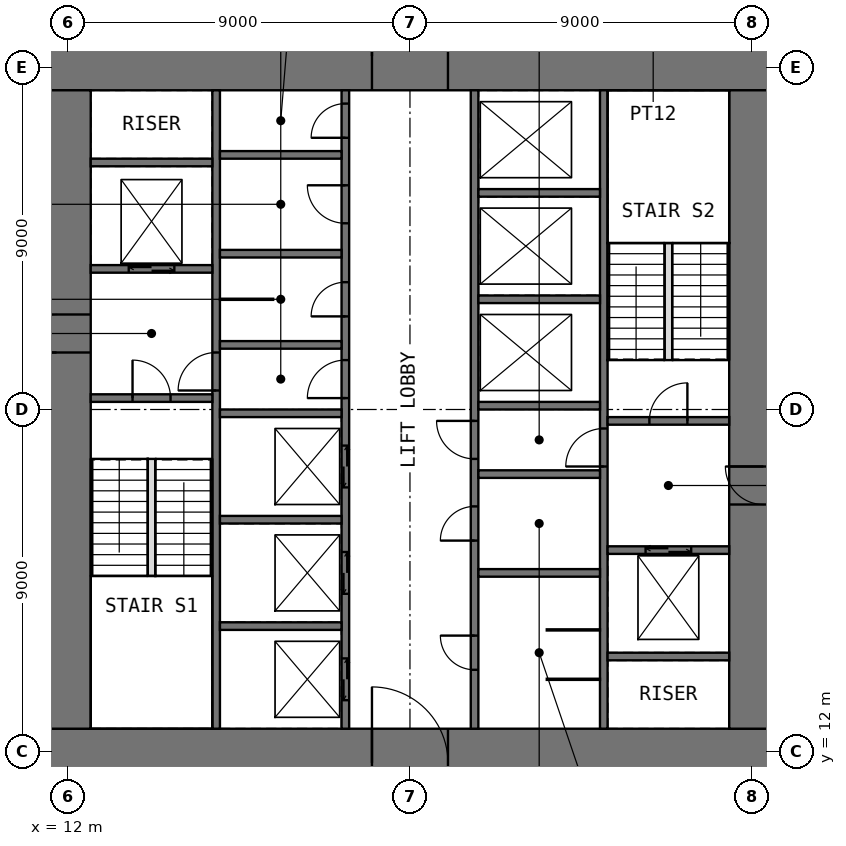
"""IFC4 building model, lengths in metres.
Left out: names, types, materials, properties, quantities, classifications, styles, units other than length and angle.
Written with IfcOpenShell. Run it as: python <this file> out.ifc"""

import sys

from ifc_helpers import new_model, si_unit, direction, frame, frame_2d, origin, place, context, subcontext, project, spatial, rectangle, extrude, element, fill, save


model = new_model("IFC4")
c1 = context("Model", 3, precision=1e-05, world=origin(), true_north=direction((0.0, 1.0)))
c2 = subcontext(c1, "Body", "Model", "MODEL_VIEW")
j1 = project(units=[si_unit("LENGTHUNIT", "METRE"), si_unit("PLANEANGLEUNIT", "RADIAN")], contexts=[c1])
p1 = place(None, origin())
s1 = spatial("IfcSite", under=j1, at=p1, CompositionType="ELEMENT")
p2 = place(p1, origin())
s2 = spatial("IfcBuilding", under=s1, at=p2, CompositionType="ELEMENT")
p3 = place(p2, frame((0.0, 0.0, 78.5)))
s3 = spatial("IfcBuildingStorey", under=s2, at=p3, CompositionType="ELEMENT", Elevation=78.5)
p4 = place(p3, frame((10.8, 11.7, -0.05), z_axis=(0.0, 0.0, 1.0), x_axis=(1.0, 0.0, 0.0)))
e1 = element("IfcWall", 1, at=p4, inside=s3, PredefinedType="SHEAR", context=c2, shape_type="SweptSolid", body=[
    extrude(rectangle(XDim=20.4, YDim=1.8, at=frame_2d((10.2, 0.0))), origin(), (0.0, 0.0, 1.0), 4.0),
])
p5 = place(p4, frame((9.2, 0.0, 0.05)))
e2 = element("IfcOpeningElement", 2, at=p5, cuts=e1, PredefinedType="OPENING", context=c2, shape_type="SweptSolid", body=[
    extrude(rectangle(XDim=2.0, YDim=2.2, at=frame_2d((1.0, 1.1))), frame((0.0, 0.91, 0.0), z_axis=(0.0, -1.0, 0.0), x_axis=(1.0, 0.0, 0.0)), (0.0, 0.0, 1.0), 1.82),
])
p6 = place(p3, frame((10.8, 30.3, -0.05), z_axis=(0.0, 0.0, 1.0), x_axis=(1.0, 0.0, 0.0)))
e3 = element("IfcWall", 3, at=p6, inside=s3, PredefinedType="SHEAR", context=c2, shape_type="SweptSolid", body=[
    extrude(rectangle(XDim=20.4, YDim=1.8, at=frame_2d((10.2, 0.0))), origin(), (0.0, 0.0, 1.0), 4.0),
])
p7 = place(p6, frame((9.2, 0.0, 0.05)))
e4 = element("IfcOpeningElement", 4, at=p7, cuts=e3, PredefinedType="OPENING", context=c2, shape_type="SweptSolid", body=[
    extrude(rectangle(XDim=2.0, YDim=2.2, at=frame_2d((1.0, 1.1))), frame((0.0, 0.91, 0.0), z_axis=(0.0, -1.0, 0.0), x_axis=(1.0, 0.0, 0.0)), (0.0, 0.0, 1.0), 1.82),
])
p8 = place(p3, frame((11.7, 12.6, -0.05), z_axis=(0.0, 0.0, 1.0), x_axis=(0.0, 1.0, 0.0)))
e5 = element("IfcWall", 5, at=p8, inside=s3, PredefinedType="SHEAR", context=c2, shape_type="SweptSolid", body=[
    extrude(rectangle(XDim=16.8, YDim=1.8, at=frame_2d((8.4, 0.0))), origin(), (0.0, 0.0, 1.0), 4.0),
])
p9 = place(p8, frame((9.9, 0.0, 0.05)))
e6 = element("IfcOpeningElement", 6, at=p9, cuts=e5, PredefinedType="OPENING", context=c2, shape_type="SweptSolid", body=[
    extrude(rectangle(XDim=1.0, YDim=2.2, at=frame_2d((0.5, 1.1))), frame((0.0, 0.91, 0.0), z_axis=(0.0, -1.0, 0.0), x_axis=(1.0, 0.0, 0.0)), (0.0, 0.0, 1.0), 1.82),
])
p10 = place(p3, frame((30.3, 12.6, -0.05), z_axis=(0.0, 0.0, 1.0), x_axis=(0.0, 1.0, 0.0)))
e7 = element("IfcWall", 7, at=p10, inside=s3, PredefinedType="SHEAR", context=c2, shape_type="SweptSolid", body=[
    extrude(rectangle(XDim=16.8, YDim=1.8, at=frame_2d((8.4, 0.0))), origin(), (0.0, 0.0, 1.0), 4.0),
])
p11 = place(p10, frame((5.9, 0.0, 0.05)))
e8 = element("IfcOpeningElement", 8, at=p11, cuts=e7, PredefinedType="OPENING", context=c2, shape_type="SweptSolid", body=[
    extrude(rectangle(XDim=1.0, YDim=2.2, at=frame_2d((0.5, 1.1))), frame((0.0, 0.91, 0.0), z_axis=(0.0, -1.0, 0.0), x_axis=(1.0, 0.0, 0.0)), (0.0, 0.0, 1.0), 1.82),
])
p12 = place(p3, frame((15.9, 12.6, -0.05), z_axis=(0.0, 0.0, 1.0), x_axis=(0.0, 1.0, 0.0)))
e9 = element("IfcWall", 9, at=p12, inside=s3, PredefinedType="SHEAR", context=c2, shape_type="SweptSolid", body=[
    extrude(rectangle(XDim=16.8, YDim=0.2, at=frame_2d((8.4, 0.0))), origin(), (0.0, 0.0, 1.0), 4.0),
])
p13 = place(p12, frame((8.9, 0.0, 0.05)))
e10 = element("IfcOpeningElement", 10, at=p13, cuts=e9, PredefinedType="OPENING", context=c2, shape_type="SweptSolid", body=[
    extrude(rectangle(XDim=1.0, YDim=2.2, at=frame_2d((0.5, 1.1))), frame((0.0, 0.11, 0.0), z_axis=(0.0, -1.0, 0.0), x_axis=(1.0, 0.0, 0.0)), (0.0, 0.0, 1.0), 0.22),
])
p14 = place(p3, frame((19.3, 12.6, -0.05), z_axis=(0.0, 0.0, 1.0), x_axis=(0.0, 1.0, 0.0)))
e11 = element("IfcWall", 11, at=p14, inside=s3, PredefinedType="SHEAR", context=c2, shape_type="SweptSolid", body=[
    extrude(rectangle(XDim=16.8, YDim=0.2, at=frame_2d((8.4, 0.0))), origin(), (0.0, 0.0, 1.0), 4.0),
])
p15 = place(p14, frame((8.7, 0.0, 0.05)))
e12 = element("IfcOpeningElement", 12, at=p15, cuts=e11, PredefinedType="OPENING", context=c2, shape_type="SweptSolid", body=[
    extrude(rectangle(XDim=1.0, YDim=2.2, at=frame_2d((0.5, 1.1))), frame((0.0, 0.11, 0.0), z_axis=(0.0, -1.0, 0.0), x_axis=(1.0, 0.0, 0.0)), (0.0, 0.0, 1.0), 0.22),
])
p16 = place(p14, frame((10.85, 0.0, 0.05)))
e13 = element("IfcOpeningElement", 13, at=p16, cuts=e11, PredefinedType="OPENING", context=c2, shape_type="SweptSolid", body=[
    extrude(rectangle(XDim=0.9, YDim=2.2, at=frame_2d((0.45, 1.1))), frame((0.0, 0.11, 0.0), z_axis=(0.0, -1.0, 0.0), x_axis=(1.0, 0.0, 0.0)), (0.0, 0.0, 1.0), 0.22),
])
p17 = place(p14, frame((13.3, 0.0, 0.05)))
e14 = element("IfcOpeningElement", 14, at=p17, cuts=e11, PredefinedType="OPENING", context=c2, shape_type="SweptSolid", body=[
    extrude(rectangle(XDim=1.0, YDim=2.2, at=frame_2d((0.5, 1.1))), frame((0.0, 0.11, 0.0), z_axis=(0.0, -1.0, 0.0), x_axis=(1.0, 0.0, 0.0)), (0.0, 0.0, 1.0), 0.22),
])
p18 = place(p14, frame((15.55, 0.0, 0.05)))
e15 = element("IfcOpeningElement", 15, at=p18, cuts=e11, PredefinedType="OPENING", context=c2, shape_type="SweptSolid", body=[
    extrude(rectangle(XDim=0.9, YDim=2.2, at=frame_2d((0.45, 1.1))), frame((0.0, 0.11, 0.0), z_axis=(0.0, -1.0, 0.0), x_axis=(1.0, 0.0, 0.0)), (0.0, 0.0, 1.0), 0.22),
])
p19 = place(p14, frame((0.75, 0.0, 0.05)))
e16 = element("IfcOpeningElement", 16, at=p19, cuts=e11, PredefinedType="OPENING", context=c2, shape_type="SweptSolid", body=[
    extrude(rectangle(XDim=1.1, YDim=2.2, at=frame_2d((0.55, 1.1))), frame((0.0, 0.11, 0.0), z_axis=(0.0, -1.0, 0.0), x_axis=(1.0, 0.0, 0.0)), (0.0, 0.0, 1.0), 0.22),
])
p20 = place(p14, frame((3.55, 0.0, 0.05)))
e17 = element("IfcOpeningElement", 17, at=p20, cuts=e11, PredefinedType="OPENING", context=c2, shape_type="SweptSolid", body=[
    extrude(rectangle(XDim=1.1, YDim=2.2, at=frame_2d((0.55, 1.1))), frame((0.0, 0.11, 0.0), z_axis=(0.0, -1.0, 0.0), x_axis=(1.0, 0.0, 0.0)), (0.0, 0.0, 1.0), 0.22),
])
p21 = place(p14, frame((6.35, 0.0, 0.05)))
e18 = element("IfcOpeningElement", 18, at=p21, cuts=e11, PredefinedType="OPENING", context=c2, shape_type="SweptSolid", body=[
    extrude(rectangle(XDim=1.1, YDim=2.2, at=frame_2d((0.55, 1.1))), frame((0.0, 0.11, 0.0), z_axis=(0.0, -1.0, 0.0), x_axis=(1.0, 0.0, 0.0)), (0.0, 0.0, 1.0), 0.22),
])
p22 = place(p3, frame((22.7, 12.6, -0.05), z_axis=(0.0, 0.0, 1.0), x_axis=(0.0, 1.0, 0.0)))
e19 = element("IfcWall", 19, at=p22, inside=s3, PredefinedType="SHEAR", context=c2, shape_type="SweptSolid", body=[
    extrude(rectangle(XDim=16.8, YDim=0.2, at=frame_2d((8.4, 0.0))), origin(), (0.0, 0.0, 1.0), 4.0),
])
p23 = place(p22, frame((7.1, 0.0, 0.05)))
e20 = element("IfcOpeningElement", 20, at=p23, cuts=e19, PredefinedType="OPENING", context=c2, shape_type="SweptSolid", body=[
    extrude(rectangle(XDim=1.0, YDim=2.2, at=frame_2d((0.5, 1.1))), frame((0.0, 0.11, 0.0), z_axis=(0.0, -1.0, 0.0), x_axis=(1.0, 0.0, 0.0)), (0.0, 0.0, 1.0), 0.22),
])
p24 = place(p22, frame((1.55, 0.0, 0.05)))
e21 = element("IfcOpeningElement", 21, at=p24, cuts=e19, PredefinedType="OPENING", context=c2, shape_type="SweptSolid", body=[
    extrude(rectangle(XDim=0.9, YDim=2.2, at=frame_2d((0.45, 1.1))), frame((0.0, 0.11, 0.0), z_axis=(0.0, -1.0, 0.0), x_axis=(1.0, 0.0, 0.0)), (0.0, 0.0, 1.0), 0.22),
])
p25 = place(p22, frame((4.95, 0.0, 0.05)))
e22 = element("IfcOpeningElement", 22, at=p25, cuts=e19, PredefinedType="OPENING", context=c2, shape_type="SweptSolid", body=[
    extrude(rectangle(XDim=0.9, YDim=2.2, at=frame_2d((0.45, 1.1))), frame((0.0, 0.11, 0.0), z_axis=(0.0, -1.0, 0.0), x_axis=(1.0, 0.0, 0.0)), (0.0, 0.0, 1.0), 0.22),
])
p26 = place(p3, frame((26.1, 12.6, -0.05), z_axis=(0.0, 0.0, 1.0), x_axis=(0.0, 1.0, 0.0)))
e23 = element("IfcWall", 23, at=p26, inside=s3, PredefinedType="SHEAR", context=c2, shape_type="SweptSolid", body=[
    extrude(rectangle(XDim=16.8, YDim=0.2, at=frame_2d((8.4, 0.0))), origin(), (0.0, 0.0, 1.0), 4.0),
])
p27 = place(p26, frame((6.9, 0.0, 0.05)))
e24 = element("IfcOpeningElement", 24, at=p27, cuts=e23, PredefinedType="OPENING", context=c2, shape_type="SweptSolid", body=[
    extrude(rectangle(XDim=1.0, YDim=2.2, at=frame_2d((0.5, 1.1))), frame((0.0, 0.11, 0.0), z_axis=(0.0, -1.0, 0.0), x_axis=(1.0, 0.0, 0.0)), (0.0, 0.0, 1.0), 0.22),
])
p28 = place(p3, frame((12.6, 21.3, -0.05), z_axis=(0.0, 0.0, 1.0), x_axis=(1.0, 0.0, 0.0)))
e25 = element("IfcWall", 25, at=p28, inside=s3, PredefinedType="SHEAR", context=c2, shape_type="SweptSolid", body=[
    extrude(rectangle(XDim=3.2, YDim=0.2, at=frame_2d((1.6, 0.0))), origin(), (0.0, 0.0, 1.0), 4.0),
])
p29 = place(p28, frame((1.1, 0.0, 0.05)))
e26 = element("IfcOpeningElement", 26, at=p29, cuts=e25, PredefinedType="OPENING", context=c2, shape_type="SweptSolid", body=[
    extrude(rectangle(XDim=1.0, YDim=2.2, at=frame_2d((0.5, 1.1))), frame((0.0, 0.11, 0.0), z_axis=(0.0, -1.0, 0.0), x_axis=(1.0, 0.0, 0.0)), (0.0, 0.0, 1.0), 0.22),
])
p30 = place(p3, frame((12.6, 24.7, -0.05), z_axis=(0.0, 0.0, 1.0), x_axis=(1.0, 0.0, 0.0)))
e27 = element("IfcWall", 27, at=p30, inside=s3, PredefinedType="SHEAR", context=c2, shape_type="SweptSolid", body=[
    extrude(rectangle(XDim=3.2, YDim=0.2, at=frame_2d((1.6, 0.0))), origin(), (0.0, 0.0, 1.0), 4.0),
])
p31 = place(p30, frame((1.0, 0.0, 0.05)))
e28 = element("IfcOpeningElement", 28, at=p31, cuts=e27, PredefinedType="OPENING", context=c2, shape_type="SweptSolid", body=[
    extrude(rectangle(XDim=1.2, YDim=2.2, at=frame_2d((0.6, 1.1))), frame((0.0, 0.11, 0.0), z_axis=(0.0, -1.0, 0.0), x_axis=(1.0, 0.0, 0.0)), (0.0, 0.0, 1.0), 0.22),
])
for number, where, z_axis, x_axis in (
    (29, (12.6, 27.5, -0.05), (0.0, 0.0, 1.0), (1.0, 0.0, 0.0)),
    (30, (16.0, 15.3, -0.05), (0.0, 0.0, 1.0), (1.0, 0.0, 0.0)),
    (31, (16.0, 18.1, -0.05), (0.0, 0.0, 1.0), (1.0, 0.0, 0.0)),
    (32, (16.0, 20.9, -0.05), (0.0, 0.0, 1.0), (1.0, 0.0, 0.0)),
    (33, (16.0, 22.7, -0.05), (0.0, 0.0, 1.0), (1.0, 0.0, 0.0)),
    (34, (16.0, 25.1, -0.05), (0.0, 0.0, 1.0), (1.0, 0.0, 0.0)),
    (35, (16.0, 27.7, -0.05), (0.0, 0.0, 1.0), (1.0, 0.0, 0.0)),
    (36, (22.8, 16.7, -0.05), (0.0, 0.0, 1.0), (1.0, 0.0, 0.0)),
    (37, (22.8, 19.3, -0.05), (0.0, 0.0, 1.0), (1.0, 0.0, 0.0)),
    (38, (22.8, 21.1, -0.05), (0.0, 0.0, 1.0), (1.0, 0.0, 0.0)),
    (39, (22.8, 23.9, -0.05), (0.0, 0.0, 1.0), (1.0, 0.0, 0.0)),
    (40, (22.8, 26.7, -0.05), (0.0, 0.0, 1.0), (1.0, 0.0, 0.0)),
    (41, (26.2, 14.5, -0.05), (0.0, 0.0, 1.0), (1.0, 0.0, 0.0)),
):
    element("IfcWall", number, at=place(p3, frame(where, z_axis=z_axis, x_axis=x_axis)), inside=s3, PredefinedType="SHEAR", context=c2, shape_type="SweptSolid", body=[
        extrude(rectangle(XDim=3.2, YDim=0.2, at=frame_2d((1.6, 0.0))), origin(), (0.0, 0.0, 1.0), 4.0),
    ])
p32 = place(p3, frame((26.2, 17.3, -0.05), z_axis=(0.0, 0.0, 1.0), x_axis=(1.0, 0.0, 0.0)))
e42 = element("IfcWall", 42, at=p32, inside=s3, PredefinedType="SHEAR", context=c2, shape_type="SweptSolid", body=[
    extrude(rectangle(XDim=3.2, YDim=0.2, at=frame_2d((1.6, 0.0))), origin(), (0.0, 0.0, 1.0), 4.0),
])
p33 = place(p32, frame((1.0, 0.0, 0.05)))
e43 = element("IfcOpeningElement", 43, at=p33, cuts=e42, PredefinedType="OPENING", context=c2, shape_type="SweptSolid", body=[
    extrude(rectangle(XDim=1.2, YDim=2.2, at=frame_2d((0.6, 1.1))), frame((0.0, 0.11, 0.0), z_axis=(0.0, -1.0, 0.0), x_axis=(1.0, 0.0, 0.0)), (0.0, 0.0, 1.0), 0.22),
])
p34 = place(p3, frame((26.2, 20.7, -0.05), z_axis=(0.0, 0.0, 1.0), x_axis=(1.0, 0.0, 0.0)))
e44 = element("IfcWall", 44, at=p34, inside=s3, PredefinedType="SHEAR", context=c2, shape_type="SweptSolid", body=[
    extrude(rectangle(XDim=3.2, YDim=0.2, at=frame_2d((1.6, 0.0))), origin(), (0.0, 0.0, 1.0), 4.0),
])
p35 = place(p34, frame((1.1, 0.0, 0.05)))
e45 = element("IfcOpeningElement", 45, at=p35, cuts=e44, PredefinedType="OPENING", context=c2, shape_type="SweptSolid", body=[
    extrude(rectangle(XDim=1.0, YDim=2.2, at=frame_2d((0.5, 1.1))), frame((0.0, 0.11, 0.0), z_axis=(0.0, -1.0, 0.0), x_axis=(1.0, 0.0, 0.0)), (0.0, 0.0, 1.0), 0.22),
])
for number, where, z_axis, x_axis in (
    (46, (24.6, 13.9, 0.0), (0.0, 0.0, 1.0), (1.0, 0.0, 0.0)),
    (47, (24.6, 15.2, 0.0), (0.0, 0.0, 1.0), (1.0, 0.0, 0.0)),
    (48, (16.0, 23.9, 0.0), (0.0, 0.0, 1.0), (1.0, 0.0, 0.0)),
):
    element("IfcWall", number, at=place(p3, frame(where, z_axis=z_axis, x_axis=x_axis)), inside=s3, PredefinedType="PARTITIONING", context=c2, shape_type="SweptSolid", body=[
        extrude(rectangle(XDim=1.4, YDim=0.03, at=frame_2d((0.7, 0.0))), origin(), (0.0, 0.0, 1.0), 3.75),
    ])
for number, where, z_axis, x_axis in (
    (49, (14.2, 16.62, 0.0), (0.0, 0.0, 1.0), (0.0, 1.0, 0.0)),
    (50, (27.8, 22.3, 0.0), (0.0, 0.0, 1.0), (0.0, 1.0, 0.0)),
):
    element("IfcWall", number, at=place(p3, frame(where, z_axis=z_axis, x_axis=x_axis)), inside=s3, PredefinedType="PARTITIONING", context=c2, shape_type="SweptSolid", body=[
        extrude(rectangle(XDim=3.08, YDim=0.2, at=frame_2d((1.54, 0.0))), origin(), (0.0, 0.0, 1.0), 4.0),
    ])
p36 = place(p5, origin())
e51 = element("IfcDoor", 51, at=p36, inside=s3, OperationType="DOUBLE_DOOR_SINGLE_SWING", PredefinedType="DOOR", context=c2, shape_type="SweptSolid", body=[
    extrude(rectangle(XDim=2.0, YDim=2.2, at=frame_2d((1.0, 1.1))), frame((0.0, 0.025, 0.0), z_axis=(0.0, -1.0, 0.0), x_axis=(1.0, 0.0, 0.0)), (0.0, 0.0, 1.0), 0.05),
])
fill(e2, e51)
p37 = place(p7, origin())
e52 = element("IfcDoor", 52, at=p37, inside=s3, OperationType="DOUBLE_DOOR_SINGLE_SWING", PredefinedType="DOOR", context=c2, shape_type="SweptSolid", body=[
    extrude(rectangle(XDim=2.0, YDim=2.2, at=frame_2d((1.0, 1.1))), frame((0.0, 0.025, 0.0), z_axis=(0.0, -1.0, 0.0), x_axis=(1.0, 0.0, 0.0)), (0.0, 0.0, 1.0), 0.05),
])
fill(e4, e52)
p38 = place(p9, origin())
e53 = element("IfcDoor", 53, at=p38, inside=s3, OperationType="SINGLE_SWING_LEFT", PredefinedType="DOOR", context=c2, shape_type="SweptSolid", body=[
    extrude(rectangle(XDim=1.0, YDim=2.2, at=frame_2d((0.5, 1.1))), frame((0.0, 0.025, 0.0), z_axis=(0.0, -1.0, 0.0), x_axis=(1.0, 0.0, 0.0)), (0.0, 0.0, 1.0), 0.05),
])
fill(e6, e53)
p39 = place(p11, origin())
e54 = element("IfcDoor", 54, at=p39, inside=s3, OperationType="SINGLE_SWING_RIGHT", PredefinedType="DOOR", context=c2, shape_type="SweptSolid", body=[
    extrude(rectangle(XDim=1.0, YDim=2.2, at=frame_2d((0.5, 1.1))), frame((0.0, 0.025, 0.0), z_axis=(0.0, -1.0, 0.0), x_axis=(1.0, 0.0, 0.0)), (0.0, 0.0, 1.0), 0.05),
])
fill(e8, e54)
p40 = place(p29, origin())
e55 = element("IfcDoor", 55, at=p40, inside=s3, OperationType="SINGLE_SWING_LEFT", PredefinedType="DOOR", context=c2, shape_type="SweptSolid", body=[
    extrude(rectangle(XDim=1.0, YDim=2.2, at=frame_2d((0.5, 1.1))), frame((0.0, 0.025, 0.0), z_axis=(0.0, -1.0, 0.0), x_axis=(1.0, 0.0, 0.0)), (0.0, 0.0, 1.0), 0.05),
])
fill(e26, e55)
p41 = place(p35, origin())
e56 = element("IfcDoor", 56, at=p41, inside=s3, OperationType="SINGLE_SWING_RIGHT", PredefinedType="DOOR", context=c2, shape_type="SweptSolid", body=[
    extrude(rectangle(XDim=1.0, YDim=2.2, at=frame_2d((0.5, 1.1))), frame((0.0, 0.025, 0.0), z_axis=(0.0, -1.0, 0.0), x_axis=(1.0, 0.0, 0.0)), (0.0, 0.0, 1.0), 0.05),
])
fill(e45, e56)
p42 = place(p13, origin())
e57 = element("IfcDoor", 57, at=p42, inside=s3, OperationType="SINGLE_SWING_LEFT", PredefinedType="DOOR", context=c2, shape_type="SweptSolid", body=[
    extrude(rectangle(XDim=1.0, YDim=2.2, at=frame_2d((0.5, 1.1))), frame((0.0, 0.025, 0.0), z_axis=(0.0, -1.0, 0.0), x_axis=(1.0, 0.0, 0.0)), (0.0, 0.0, 1.0), 0.05),
])
fill(e10, e57)
p43 = place(p27, origin())
e58 = element("IfcDoor", 58, at=p43, inside=s3, OperationType="SINGLE_SWING_LEFT", PredefinedType="DOOR", context=c2, shape_type="SweptSolid", body=[
    extrude(rectangle(XDim=1.0, YDim=2.2, at=frame_2d((0.5, 1.1))), frame((0.0, 0.025, 0.0), z_axis=(0.0, -1.0, 0.0), x_axis=(1.0, 0.0, 0.0)), (0.0, 0.0, 1.0), 0.05),
])
fill(e24, e58)
p44 = place(p15, origin())
e59 = element("IfcDoor", 59, at=p44, inside=s3, OperationType="SINGLE_SWING_LEFT", PredefinedType="DOOR", context=c2, shape_type="SweptSolid", body=[
    extrude(rectangle(XDim=1.0, YDim=2.2, at=frame_2d((0.5, 1.1))), frame((0.0, 0.025, 0.0), z_axis=(0.0, -1.0, 0.0), x_axis=(1.0, 0.0, 0.0)), (0.0, 0.0, 1.0), 0.05),
])
fill(e12, e59)
p45 = place(p23, origin())
e60 = element("IfcDoor", 60, at=p45, inside=s3, OperationType="SINGLE_SWING_RIGHT", PredefinedType="DOOR", context=c2, shape_type="SweptSolid", body=[
    extrude(rectangle(XDim=1.0, YDim=2.2, at=frame_2d((0.5, 1.1))), frame((0.0, 0.025, 0.0), z_axis=(0.0, -1.0, 0.0), x_axis=(1.0, 0.0, 0.0)), (0.0, 0.0, 1.0), 0.05),
])
fill(e20, e60)
p46 = place(p16, origin())
e61 = element("IfcDoor", 61, at=p46, inside=s3, OperationType="SINGLE_SWING_LEFT", PredefinedType="DOOR", context=c2, shape_type="SweptSolid", body=[
    extrude(rectangle(XDim=0.9, YDim=2.2, at=frame_2d((0.45, 1.1))), frame((0.0, 0.025, 0.0), z_axis=(0.0, -1.0, 0.0), x_axis=(1.0, 0.0, 0.0)), (0.0, 0.0, 1.0), 0.05),
])
fill(e13, e61)
p47 = place(p17, origin())
e62 = element("IfcDoor", 62, at=p47, inside=s3, OperationType="SINGLE_SWING_RIGHT", PredefinedType="DOOR", context=c2, shape_type="SweptSolid", body=[
    extrude(rectangle(XDim=1.0, YDim=2.2, at=frame_2d((0.5, 1.1))), frame((0.0, 0.025, 0.0), z_axis=(0.0, -1.0, 0.0), x_axis=(1.0, 0.0, 0.0)), (0.0, 0.0, 1.0), 0.05),
])
fill(e14, e62)
p48 = place(p18, origin())
e63 = element("IfcDoor", 63, at=p48, inside=s3, OperationType="SINGLE_SWING_LEFT", PredefinedType="DOOR", context=c2, shape_type="SweptSolid", body=[
    extrude(rectangle(XDim=0.9, YDim=2.2, at=frame_2d((0.45, 1.1))), frame((0.0, 0.025, 0.0), z_axis=(0.0, -1.0, 0.0), x_axis=(1.0, 0.0, 0.0)), (0.0, 0.0, 1.0), 0.05),
])
fill(e15, e63)
p49 = place(p24, origin())
e64 = element("IfcDoor", 64, at=p49, inside=s3, OperationType="SINGLE_SWING_RIGHT", PredefinedType="DOOR", context=c2, shape_type="SweptSolid", body=[
    extrude(rectangle(XDim=0.9, YDim=2.2, at=frame_2d((0.45, 1.1))), frame((0.0, 0.025, 0.0), z_axis=(0.0, -1.0, 0.0), x_axis=(1.0, 0.0, 0.0)), (0.0, 0.0, 1.0), 0.05),
])
fill(e21, e64)
p50 = place(p25, origin())
e65 = element("IfcDoor", 65, at=p50, inside=s3, OperationType="SINGLE_SWING_LEFT", PredefinedType="DOOR", context=c2, shape_type="SweptSolid", body=[
    extrude(rectangle(XDim=0.9, YDim=2.2, at=frame_2d((0.45, 1.1))), frame((0.0, 0.025, 0.0), z_axis=(0.0, -1.0, 0.0), x_axis=(1.0, 0.0, 0.0)), (0.0, 0.0, 1.0), 0.05),
])
fill(e22, e65)
p51 = place(p19, origin())
e66 = element("IfcDoor", 66, at=p51, inside=s3, OperationType="DOUBLE_DOOR_SLIDING", PredefinedType="DOOR", context=c2, shape_type="SweptSolid", body=[
    extrude(rectangle(XDim=1.1, YDim=2.2, at=frame_2d((0.55, 1.1))), frame((0.0, 0.025, 0.0), z_axis=(0.0, -1.0, 0.0), x_axis=(1.0, 0.0, 0.0)), (0.0, 0.0, 1.0), 0.05),
])
fill(e16, e66)
p52 = place(p20, origin())
e67 = element("IfcDoor", 67, at=p52, inside=s3, OperationType="DOUBLE_DOOR_SLIDING", PredefinedType="DOOR", context=c2, shape_type="SweptSolid", body=[
    extrude(rectangle(XDim=1.1, YDim=2.2, at=frame_2d((0.55, 1.1))), frame((0.0, 0.025, 0.0), z_axis=(0.0, -1.0, 0.0), x_axis=(1.0, 0.0, 0.0)), (0.0, 0.0, 1.0), 0.05),
])
fill(e17, e67)
p53 = place(p21, origin())
e68 = element("IfcDoor", 68, at=p53, inside=s3, OperationType="DOUBLE_DOOR_SLIDING", PredefinedType="DOOR", context=c2, shape_type="SweptSolid", body=[
    extrude(rectangle(XDim=1.1, YDim=2.2, at=frame_2d((0.55, 1.1))), frame((0.0, 0.025, 0.0), z_axis=(0.0, -1.0, 0.0), x_axis=(1.0, 0.0, 0.0)), (0.0, 0.0, 1.0), 0.05),
])
fill(e18, e68)
p54 = place(p31, origin())
e69 = element("IfcDoor", 69, at=p54, inside=s3, OperationType="DOUBLE_DOOR_SLIDING", PredefinedType="DOOR", context=c2, shape_type="SweptSolid", body=[
    extrude(rectangle(XDim=1.2, YDim=2.2, at=frame_2d((0.6, 1.1))), frame((0.0, 0.025, 0.0), z_axis=(0.0, -1.0, 0.0), x_axis=(1.0, 0.0, 0.0)), (0.0, 0.0, 1.0), 0.05),
])
fill(e28, e69)
p55 = place(p33, origin())
e70 = element("IfcDoor", 70, at=p55, inside=s3, OperationType="DOUBLE_DOOR_SLIDING", PredefinedType="DOOR", context=c2, shape_type="SweptSolid", body=[
    extrude(rectangle(XDim=1.2, YDim=2.2, at=frame_2d((0.6, 1.1))), frame((0.0, 0.025, 0.0), z_axis=(0.0, -1.0, 0.0), x_axis=(1.0, 0.0, 0.0)), (0.0, 0.0, 1.0), 0.05),
])
fill(e43, e70)
save(model, sys.argv[1])
